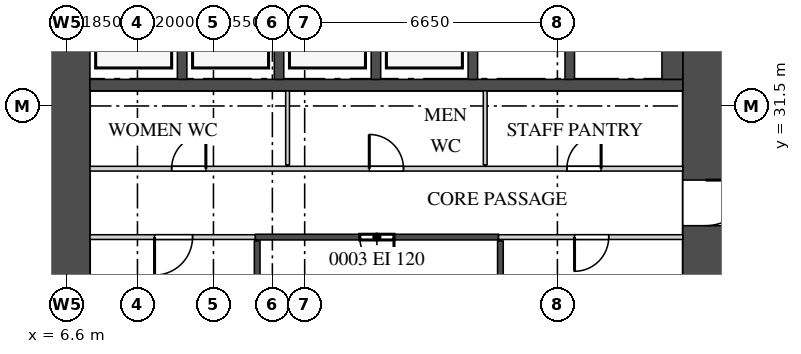
"""IFC4 building model, lengths in metres.
Left out: names, types, materials, properties, quantities, classifications, styles, units other than length and angle.
Written with IfcOpenShell. Run it as: python <this file> out.ifc"""

import sys

from ifc_helpers import new_model, si_unit, direction, frame, frame_2d, origin, place, context, subcontext, project, spatial, rectangle, extrude, source, transform, mapped, element, fill, save


model = new_model("IFC4")
c1 = context("Model", 3, precision=1e-05, world=origin(), true_north=direction((0.0, 1.0)))
c2 = subcontext(c1, "Body", "Model", "MODEL_VIEW")
j1 = project(units=[si_unit("LENGTHUNIT", "METRE"), si_unit("PLANEANGLEUNIT", "RADIAN")], contexts=[c1])
p1 = place(None, origin())
s1 = spatial("IfcSite", under=j1, at=p1, CompositionType="ELEMENT")
p2 = place(p1, origin())
s2 = spatial("IfcBuilding", under=s1, at=p2, CompositionType="ELEMENT")
p3 = place(p2, frame((0.0, 0.0, 46.5)))
s3 = spatial("IfcBuildingStorey", under=s2, at=p3, CompositionType="ELEMENT", Elevation=46.5)
m1 = source(origin(), c2, "Body", "SweptSolid", [
    extrude(rectangle(XDim=27.6, YDim=1.2, at=frame_2d((13.8, 0.0))), origin(), (0.0, 0.0, 1.0), 4.2),
])
p4 = place(p3, frame((23.4, 13.2, 0.0), z_axis=(0.0, 0.0, 1.0), x_axis=(0.0, 1.0, 0.0)))
e1 = element("IfcWall", 1, at=p4, inside=s3, PredefinedType="SHEAR", context=c2, shape_type="MappedRepresentation", body=[
    mapped(m1, transform((0.0, 0.0, 0.0))),
])
m2 = source(origin(), c2, "Body", "SweptSolid", [
    extrude(rectangle(XDim=1.8, YDim=2.1, at=frame_2d((0.9, 1.05))), frame((0.0, 0.61, 0.0), z_axis=(0.0, -1.0, 0.0), x_axis=(1.0, 0.0, 0.0)), (0.0, 0.0, 1.0), 1.22),
])
p5 = place(p4, frame((22.4, 0.0, 0.0)))
e2 = element("IfcOpeningElement", 2, at=p5, cuts=e1, PredefinedType="OPENING", context=c2, shape_type="MappedRepresentation", body=[
    mapped(m2, transform((0.0, 0.0, 0.0))),
])
m3 = source(origin(), c2, "Body", "SweptSolid", [
    extrude(rectangle(XDim=1.2, YDim=2.1, at=frame_2d((0.6, 1.05))), frame((0.0, 0.61, 0.0), z_axis=(0.0, -1.0, 0.0), x_axis=(1.0, 0.0, 0.0)), (0.0, 0.0, 1.0), 1.22),
])
p6 = place(p4, frame((15.15, 0.0, 0.0)))
e3 = element("IfcOpeningElement", 3, at=p6, cuts=e1, PredefinedType="OPENING", context=c2, shape_type="MappedRepresentation", body=[
    mapped(m3, transform((0.0, 0.0, 0.0))),
])
m4 = source(origin(), c2, "Body", "SweptSolid", [
    extrude(rectangle(XDim=0.9, YDim=2.1, at=frame_2d((0.45, 1.05))), frame((0.0, 0.61, 0.0), z_axis=(0.0, -1.0, 0.0), x_axis=(1.0, 0.0, 0.0)), (0.0, 0.0, 1.0), 1.22),
])
p7 = place(p4, frame((1.15, 0.0, 0.0)))
e4 = element("IfcOpeningElement", 4, at=p7, cuts=e1, PredefinedType="OPENING", context=c2, shape_type="MappedRepresentation", body=[
    mapped(m4, transform((0.0, 0.0, 0.0))),
])
p8 = place(p4, frame((4.35, 0.0, 0.0)))
e5 = element("IfcOpeningElement", 5, at=p8, cuts=e1, PredefinedType="OPENING", context=c2, shape_type="MappedRepresentation", body=[
    mapped(m4, transform((0.0, 0.0, 0.0))),
])
p9 = place(p4, frame((7.6, 0.0, 0.0)))
e6 = element("IfcOpeningElement", 6, at=p9, cuts=e1, PredefinedType="OPENING", context=c2, shape_type="MappedRepresentation", body=[
    mapped(m4, transform((0.0, 0.0, 0.0))),
])
p10 = place(p3, frame((6.6, 13.2, 0.0), z_axis=(0.0, 0.0, 1.0), x_axis=(0.0, 1.0, 0.0)))
e7 = element("IfcWall", 7, at=p10, inside=s3, PredefinedType="SHEAR", context=c2, shape_type="MappedRepresentation", body=[
    mapped(m1, transform((0.0, 0.0, 0.0))),
])
m5 = source(origin(), c2, "Body", "SweptSolid", [
    extrude(rectangle(XDim=15.6, YDim=0.3, at=frame_2d((7.8, 0.0))), origin(), (0.0, 0.0, 1.0), 4.2),
])
p11 = place(p3, frame((7.2, 32.05, 0.0), z_axis=(0.0, 0.0, 1.0), x_axis=(1.0, 0.0, 0.0)))
e8 = element("IfcWall", 8, at=p11, inside=s3, PredefinedType="STANDARD", context=c2, shape_type="MappedRepresentation", body=[
    mapped(m5, transform((0.0, 0.0, 0.0))),
])
m6 = source(origin(), c2, "Body", "SweptSolid", [
    extrude(rectangle(XDim=2.4, YDim=0.25, at=frame_2d((1.2, 0.0))), origin(), (0.0, 0.0, 1.0), 4.2),
])
for number, where, z_axis, x_axis in (
    (9, (9.625, 32.2, 0.0), (0.0, 0.0, 1.0), (0.0, 1.0, 0.0)),
    (10, (12.175, 32.2, 0.0), (0.0, 0.0, 1.0), (0.0, 1.0, 0.0)),
    (11, (14.725, 32.2, 0.0), (0.0, 0.0, 1.0), (0.0, 1.0, 0.0)),
    (12, (17.275, 32.2, 0.0), (0.0, 0.0, 1.0), (0.0, 1.0, 0.0)),
    (13, (19.825, 32.2, 0.0), (0.0, 0.0, 1.0), (0.0, 1.0, 0.0)),
):
    element("IfcWall", number, at=place(p3, frame(where, z_axis=z_axis, x_axis=x_axis)), inside=s3, PredefinedType="STANDARD", context=c2, shape_type="MappedRepresentation", body=[
        mapped(m6, transform((0.0, 0.0, 0.0))),
    ])
m7 = source(origin(), c2, "Body", "SweptSolid", [
    extrude(rectangle(XDim=2.4, YDim=0.55, at=frame_2d((1.2, 0.0))), origin(), (0.0, 0.0, 1.0), 4.2),
])
p12 = place(p3, frame((22.525, 32.2, 0.0), z_axis=(0.0, 0.0, 1.0), x_axis=(0.0, 1.0, 0.0)))
e14 = element("IfcWall", 14, at=p12, inside=s3, PredefinedType="STANDARD", context=c2, shape_type="MappedRepresentation", body=[
    mapped(m7, transform((0.0, 0.0, 0.0))),
])
m8 = source(origin(), c2, "Body", "SweptSolid", [
    extrude(rectangle(XDim=5.05, YDim=0.15, at=frame_2d((2.525, 0.0))), origin(), (0.0, 0.0, 1.0), 4.3),
])
p13 = place(p3, frame((11.6, 22.9, 0.0), z_axis=(0.0, 0.0, 1.0), x_axis=(0.0, 1.0, 0.0)))
e15 = element("IfcWall", 15, at=p13, inside=s3, PredefinedType="PARTITIONING", context=c2, shape_type="MappedRepresentation", body=[
    mapped(m8, transform((0.0, 0.0, 0.0))),
])
m9 = source(origin(), c2, "Body", "SweptSolid", [
    extrude(rectangle(XDim=5.0, YDim=0.15, at=frame_2d((2.5, 0.0))), origin(), (0.0, 0.0, 1.0), 4.3),
])
p14 = place(p3, frame((18.0, 22.95, 0.0), z_axis=(0.0, 0.0, 1.0), x_axis=(0.0, 1.0, 0.0)))
e16 = element("IfcWall", 16, at=p14, inside=s3, PredefinedType="PARTITIONING", context=c2, shape_type="MappedRepresentation", body=[
    mapped(m9, transform((0.0, 0.0, 0.0))),
])
m10 = source(origin(), c2, "Body", "SweptSolid", [
    extrude(rectangle(XDim=4.35, YDim=0.125, at=frame_2d((2.175, 0.0))), origin(), (0.0, 0.0, 1.0), 4.3),
])
p15 = place(p3, frame((7.2, 28.05, 0.0), z_axis=(0.0, 0.0, 1.0), x_axis=(1.0, 0.0, 0.0)))
e17 = element("IfcWall", 17, at=p15, inside=s3, PredefinedType="PARTITIONING", context=c2, shape_type="MappedRepresentation", body=[
    mapped(m10, transform((0.0, 0.0, 0.0))),
])
m11 = source(origin(), c2, "Body", "SweptSolid", [
    extrude(rectangle(XDim=1.0, YDim=2.1, at=frame_2d((0.5, 1.05))), frame((0.0, 0.073, 0.0), z_axis=(0.0, -1.0, 0.0), x_axis=(1.0, 0.0, 0.0)), (0.0, 0.0, 1.0), 0.145),
])
p16 = place(p15, frame((1.7, 0.0, 0.0)))
e18 = element("IfcOpeningElement", 18, at=p16, cuts=e17, PredefinedType="OPENING", context=c2, shape_type="MappedRepresentation", body=[
    mapped(m11, transform((0.0, 0.0, 0.0))),
])
m12 = source(origin(), c2, "Body", "SweptSolid", [
    extrude(rectangle(XDim=6.4, YDim=0.15, at=frame_2d((3.2, 0.0))), origin(), (0.0, 0.0, 1.0), 4.3),
])
p17 = place(p3, frame((11.55, 28.05, 0.0), z_axis=(0.0, 0.0, 1.0), x_axis=(1.0, 0.0, 0.0)))
e19 = element("IfcWall", 19, at=p17, inside=s3, PredefinedType="PARTITIONING", context=c2, shape_type="MappedRepresentation", body=[
    mapped(m12, transform((0.0, 0.0, 0.0))),
])
m13 = source(origin(), c2, "Body", "SweptSolid", [
    extrude(rectangle(XDim=0.9, YDim=2.1, at=frame_2d((0.45, 1.05))), frame((0.0, 0.085, 0.0), z_axis=(0.0, -1.0, 0.0), x_axis=(1.0, 0.0, 0.0)), (0.0, 0.0, 1.0), 0.17),
])
p18 = place(p17, frame((2.75, 0.0, 0.0)))
e20 = element("IfcOpeningElement", 20, at=p18, cuts=e19, PredefinedType="OPENING", context=c2, shape_type="MappedRepresentation", body=[
    mapped(m13, transform((0.0, 0.0, 0.0))),
])
m14 = source(origin(), c2, "Body", "SweptSolid", [
    extrude(rectangle(XDim=4.85, YDim=0.125, at=frame_2d((2.425, 0.0))), origin(), (0.0, 0.0, 1.0), 4.3),
])
p19 = place(p3, frame((17.95, 28.05, 0.0), z_axis=(0.0, 0.0, 1.0), x_axis=(1.0, 0.0, 0.0)))
e21 = element("IfcWall", 21, at=p19, inside=s3, PredefinedType="PARTITIONING", context=c2, shape_type="MappedRepresentation", body=[
    mapped(m14, transform((0.0, 0.0, 0.0))),
])
m15 = source(origin(), c2, "Body", "SweptSolid", [
    extrude(rectangle(XDim=0.9, YDim=2.1, at=frame_2d((0.45, 1.05))), frame((0.0, 0.073, 0.0), z_axis=(0.0, -1.0, 0.0), x_axis=(1.0, 0.0, 0.0)), (0.0, 0.0, 1.0), 0.145),
])
p20 = place(p19, frame((2.0, 0.0, 0.0)))
e22 = element("IfcOpeningElement", 22, at=p20, cuts=e21, PredefinedType="OPENING", context=c2, shape_type="MappedRepresentation", body=[
    mapped(m15, transform((0.0, 0.0, 0.0))),
])
m16 = source(origin(), c2, "Body", "SweptSolid", [
    extrude(rectangle(XDim=15.6, YDim=0.125, at=frame_2d((7.8, 0.0))), origin(), (0.0, 0.0, 1.0), 4.3),
])
p21 = place(p3, frame((7.2, 29.85, 0.0), z_axis=(0.0, 0.0, 1.0), x_axis=(1.0, 0.0, 0.0)))
e23 = element("IfcWall", 23, at=p21, inside=s3, PredefinedType="PARTITIONING", context=c2, shape_type="MappedRepresentation", body=[
    mapped(m16, transform((0.0, 0.0, 0.0))),
])
p22 = place(p21, frame((2.15, 0.0, 0.0)))
e24 = element("IfcOpeningElement", 24, at=p22, cuts=e23, PredefinedType="OPENING", context=c2, shape_type="MappedRepresentation", body=[
    mapped(m15, transform((0.0, 0.0, 0.0))),
])
p23 = place(p21, frame((7.35, 0.0, 0.0)))
e25 = element("IfcOpeningElement", 25, at=p23, cuts=e23, PredefinedType="OPENING", context=c2, shape_type="MappedRepresentation", body=[
    mapped(m15, transform((0.0, 0.0, 0.0))),
])
p24 = place(p21, frame((12.55, 0.0, 0.0)))
e26 = element("IfcOpeningElement", 26, at=p24, cuts=e23, PredefinedType="OPENING", context=c2, shape_type="MappedRepresentation", body=[
    mapped(m15, transform((0.0, 0.0, 0.0))),
])
m17 = source(origin(), c2, "Body", "SweptSolid", [
    extrude(rectangle(XDim=1.95, YDim=0.1, at=frame_2d((0.975, 0.0))), origin(), (0.0, 0.0, 1.0), 4.3),
])
for number, where, z_axis, x_axis in (
    (27, (12.4, 29.95, 0.0), (0.0, 0.0, 1.0), (0.0, 1.0, 0.0)),
    (28, (17.6, 29.95, 0.0), (0.0, 0.0, 1.0), (0.0, 1.0, 0.0)),
):
    element("IfcWall", number, at=place(p3, frame(where, z_axis=z_axis, x_axis=x_axis)), inside=s3, PredefinedType="PARTITIONING", context=c2, shape_type="MappedRepresentation", body=[
        mapped(m17, transform((0.0, 0.0, 0.0))),
    ])
m18 = source(origin(), c2, "Body", "SweptSolid", [
    extrude(rectangle(XDim=1.2, YDim=2.1, at=frame_2d((0.6, 1.05))), frame((0.0, 0.55, 0.0), z_axis=(0.0, -1.0, 0.0), x_axis=(1.0, 0.0, 0.0)), (0.0, 0.0, 1.0), 1.1),
])
p25 = place(p6, origin())
e29 = element("IfcDoor", 29, at=p25, inside=s3, OperationType="SINGLE_SWING_RIGHT", PredefinedType="DOOR", context=c2, shape_type="MappedRepresentation", body=[
    mapped(m18, transform((0.0, 0.0, 0.0))),
])
fill(e3, e29)
m19 = source(origin(), c2, "Body", "SweptSolid", [
    extrude(rectangle(XDim=0.9, YDim=2.1, at=frame_2d((0.45, 1.05))), frame((0.0, 0.025, 0.0), z_axis=(0.0, -1.0, 0.0), x_axis=(1.0, 0.0, 0.0)), (0.0, 0.0, 1.0), 0.05),
])
p26 = place(p22, origin())
e30 = element("IfcDoor", 30, at=p26, inside=s3, OperationType="SINGLE_SWING_LEFT", PredefinedType="DOOR", context=c2, shape_type="MappedRepresentation", body=[
    mapped(m19, transform((0.0, 0.0, 0.0))),
])
fill(e24, e30)
p27 = place(p23, origin())
e31 = element("IfcDoor", 31, at=p27, inside=s3, OperationType="SINGLE_SWING_RIGHT", PredefinedType="DOOR", context=c2, shape_type="MappedRepresentation", body=[
    mapped(m19, transform((0.0, 0.0, 0.0))),
])
fill(e25, e31)
p28 = place(p24, origin())
e32 = element("IfcDoor", 32, at=p28, inside=s3, OperationType="SINGLE_SWING_LEFT", PredefinedType="DOOR", context=c2, shape_type="MappedRepresentation", body=[
    mapped(m19, transform((0.0, 0.0, 0.0))),
])
fill(e26, e32)
m20 = source(origin(), c2, "Body", "SweptSolid", [
    extrude(rectangle(XDim=1.0, YDim=2.1, at=frame_2d((0.5, 1.05))), frame((0.0, 0.025, 0.0), z_axis=(0.0, -1.0, 0.0), x_axis=(1.0, 0.0, 0.0)), (0.0, 0.0, 1.0), 0.05),
])
p29 = place(p16, origin())
e33 = element("IfcDoor", 33, at=p29, inside=s3, OperationType="SINGLE_SWING_LEFT", PredefinedType="DOOR", context=c2, shape_type="MappedRepresentation", body=[
    mapped(m20, transform((0.0, 0.0, 0.0))),
])
fill(e18, e33)
p30 = place(p18, origin())
e34 = element("IfcDoor", 34, at=p30, inside=s3, OperationType="SINGLE_SWING_RIGHT", PredefinedType="DOOR", context=c2, shape_type="MappedRepresentation", body=[
    mapped(m19, transform((0.0, 0.0, 0.0))),
])
fill(e20, e34)
p31 = place(p20, origin())
e35 = element("IfcDoor", 35, at=p31, inside=s3, OperationType="SINGLE_SWING_LEFT", PredefinedType="DOOR", context=c2, shape_type="MappedRepresentation", body=[
    mapped(m19, transform((0.0, 0.0, 0.0))),
])
fill(e22, e35)
save(model, sys.argv[1])
